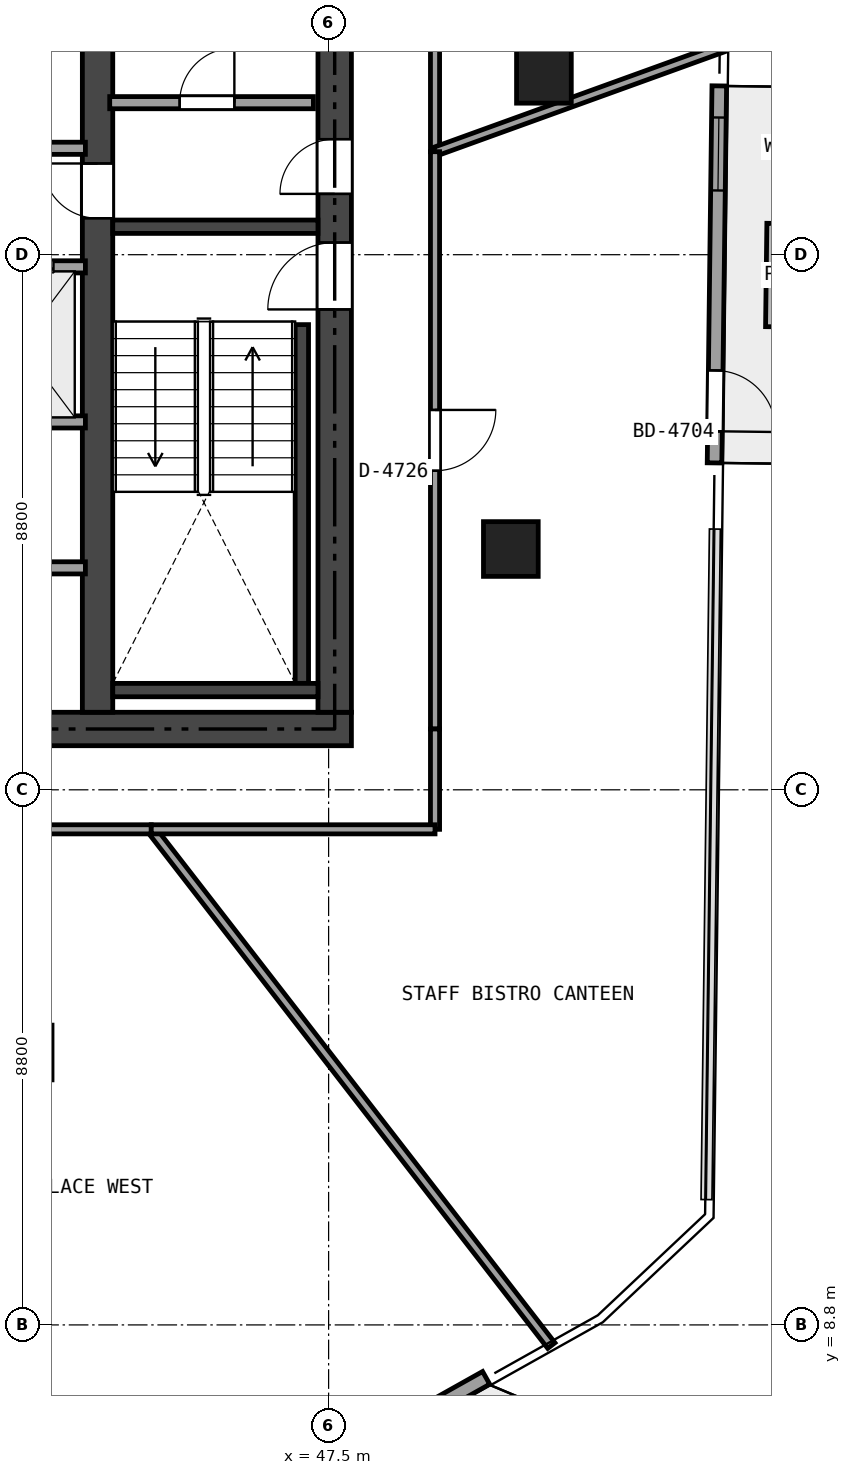
"""IFC4 building model, lengths in metres.
Left out: names, types, materials, properties, quantities, classifications, styles, units other than length and angle.
Written with IfcOpenShell. Run it as: python <this file> out.ifc"""

import sys

from ifc_helpers import new_model, si_unit, direction, frame, frame_2d, origin, origin_2d, place, context, subcontext, project, spatial, rectangle, extrude, element, fill, save


model = new_model("IFC4")
c1 = context("Model", 3, precision=1e-05, world=origin(), true_north=direction((0.0, 1.0)))
c2 = subcontext(c1, "Body", "Model", "MODEL_VIEW")
j1 = project(units=[si_unit("LENGTHUNIT", "METRE"), si_unit("PLANEANGLEUNIT", "RADIAN")], contexts=[c1])
p1 = place(None, origin())
s1 = spatial("IfcSite", under=j1, at=p1, CompositionType="ELEMENT")
p2 = place(p1, origin())
s2 = spatial("IfcBuilding", under=s1, at=p2, CompositionType="ELEMENT")
p3 = place(p2, frame((0.0, 0.0, 177.0)))
s3 = spatial("IfcBuildingStorey", under=s2, at=p3, CompositionType="ELEMENT", Elevation=177.0)
p4 = place(p3, frame((26.525, 18.6, 0.0), z_axis=(0.0, 0.0, 1.0), x_axis=(1.0, 0.0, 0.0)))
e1 = element("IfcWall", 1, at=p4, inside=s3, PredefinedType="SHEAR", context=c2, shape_type="SweptSolid", body=[
    extrude(rectangle(XDim=21.35, YDim=0.55, at=frame_2d((10.675, 0.0))), origin(), (0.0, 0.0, 1.0), 3.32),
])
p5 = place(p4, frame((12.4, 0.0, 0.0)))
e2 = element("IfcOpeningElement", 2, at=p5, cuts=e1, PredefinedType="OPENING", context=c2, shape_type="SweptSolid", body=[
    extrude(rectangle(XDim=1.15, YDim=2.15, at=frame_2d((0.575, 1.075))), frame((0.0, 0.285, 0.0), z_axis=(0.0, -1.0, 0.0), x_axis=(1.0, 0.0, 0.0)), (0.0, 0.0, 1.0), 0.57),
])
p6 = place(p4, frame((5.225, 0.0, 0.0)))
e3 = element("IfcOpeningElement", 3, at=p6, cuts=e1, PredefinedType="OPENING", context=c2, shape_type="SweptSolid", body=[
    extrude(rectangle(XDim=0.9, YDim=2.1, at=frame_2d((0.45, 1.05))), frame((0.0, 0.285, 0.0), z_axis=(0.0, -1.0, 0.0), x_axis=(1.0, 0.0, 0.0)), (0.0, 0.0, 1.0), 0.57),
])
p7 = place(p3, frame((47.6, 18.875, 0.0), z_axis=(0.0, 0.0, 1.0), x_axis=(0.0, 1.0, 0.0)))
e4 = element("IfcWall", 4, at=p7, inside=s3, PredefinedType="SHEAR", context=c2, shape_type="SweptSolid", body=[
    extrude(rectangle(XDim=15.05, YDim=0.55, at=frame_2d((7.525, 0.0))), origin(), (0.0, 0.0, 1.0), 3.32),
])
p8 = place(p7, frame((6.625, 0.0, 0.0)))
e5 = element("IfcOpeningElement", 5, at=p8, cuts=e4, PredefinedType="OPENING", context=c2, shape_type="SweptSolid", body=[
    extrude(rectangle(XDim=1.1, YDim=2.15, at=frame_2d((0.55, 1.075))), frame((0.0, 0.285, 0.0), z_axis=(0.0, -1.0, 0.0), x_axis=(1.0, 0.0, 0.0)), (0.0, 0.0, 1.0), 0.57),
])
p9 = place(p7, frame((8.525, 0.0, 0.0)))
e6 = element("IfcOpeningElement", 6, at=p9, cuts=e4, PredefinedType="OPENING", context=c2, shape_type="SweptSolid", body=[
    extrude(rectangle(XDim=0.9, YDim=2.1, at=frame_2d((0.45, 1.05))), frame((0.0, 0.285, 0.0), z_axis=(0.0, -1.0, 0.0), x_axis=(1.0, 0.0, 0.0)), (0.0, 0.0, 1.0), 0.57),
])
p10 = place(p7, frame((13.175, 0.0, 0.0)))
e7 = element("IfcOpeningElement", 7, at=p10, cuts=e4, PredefinedType="OPENING", context=c2, shape_type="SweptSolid", body=[
    extrude(rectangle(XDim=0.9, YDim=2.1, at=frame_2d((0.45, 1.05))), frame((0.0, 0.285, 0.0), z_axis=(0.0, -1.0, 0.0), x_axis=(1.0, 0.0, 0.0)), (0.0, 0.0, 1.0), 0.57),
])
p11 = place(p3, frame((43.7, 18.875, 0.0), z_axis=(0.0, 0.0, 1.0), x_axis=(0.0, 1.0, 0.0)))
e8 = element("IfcWall", 8, at=p11, inside=s3, PredefinedType="SHEAR", context=c2, shape_type="SweptSolid", body=[
    extrude(rectangle(XDim=15.05, YDim=0.5, at=frame_2d((7.525, 0.0))), origin(), (0.0, 0.0, 1.0), 3.32),
])
p12 = place(p11, frame((8.125, 0.0, 0.0)))
e9 = element("IfcOpeningElement", 9, at=p12, cuts=e8, PredefinedType="OPENING", context=c2, shape_type="SweptSolid", body=[
    extrude(rectangle(XDim=0.9, YDim=2.1, at=frame_2d((0.45, 1.05))), frame((0.0, 0.26, 0.0), z_axis=(0.0, -1.0, 0.0), x_axis=(1.0, 0.0, 0.0)), (0.0, 0.0, 1.0), 0.52),
])
p13 = place(p3, frame((43.95, 26.86, 0.0), z_axis=(0.0, 0.0, 1.0), x_axis=(1.0, 0.0, 0.0)))
e10 = element("IfcWall", 10, at=p13, inside=s3, PredefinedType="SHEAR", context=c2, shape_type="SweptSolid", body=[
    extrude(rectangle(XDim=3.375, YDim=0.22, at=frame_2d((1.688, 0.0))), origin(), (0.0, 0.0, 1.0), 3.32),
])
p14 = place(p3, frame((47.06, 19.35, 0.0), z_axis=(0.0, 0.0, 1.0), x_axis=(0.0, 1.0, 0.0)))
e11 = element("IfcWall", 11, at=p14, inside=s3, PredefinedType="SHEAR", context=c2, shape_type="SweptSolid", body=[
    extrude(rectangle(XDim=5.9, YDim=0.22, at=frame_2d((2.95, 0.0))), origin(), (0.0, 0.0, 1.0), 3.32),
])
p15 = place(p3, frame((43.95, 19.24, 0.0), z_axis=(0.0, 0.0, 1.0), x_axis=(1.0, 0.0, 0.0)))
e12 = element("IfcWall", 12, at=p15, inside=s3, PredefinedType="SHEAR", context=c2, shape_type="SweptSolid", body=[
    extrude(rectangle(XDim=3.375, YDim=0.22, at=frame_2d((1.688, 0.0))), origin(), (0.0, 0.0, 1.0), 3.32),
])
for number, where, z_axis, x_axis in (
    (13, (51.041, 29.342, -0.405), (0.0, 0.0, 1.0), (1.0, 0.0, 0.0)),
    (14, (42.501, 13.28, -0.405), (0.0, 0.0, 1.0), (1.0, 0.0, 0.0)),
    (15, (50.497, 21.56, -0.405), (0.0, 0.0, 1.0), (1.0, 0.0, 0.0)),
):
    element("IfcColumn", number, at=place(p3, frame(where, z_axis=z_axis, x_axis=x_axis)), inside=s3, PredefinedType="COLUMN", context=c2, shape_type="SweptSolid", body=[
        extrude(rectangle(XDim=0.9, YDim=0.9, at=origin_2d()), origin(), (0.0, 0.0, 1.0), 3.725),
    ])
p16 = place(p3, frame((50.091, 7.929, 0.0), z_axis=(0.0, 0.0, 1.0), x_axis=(-0.872270690653, -0.489023355504, 0.0)))
e16 = element("IfcWall", 16, at=p16, inside=s3, PredefinedType="SOLIDWALL", context=c2, shape_type="SweptSolid", body=[
    extrude(rectangle(XDim=4.0, YDim=0.24, at=frame_2d((2.0, 0.0))), origin(), (0.0, 0.0, 1.0), 3.32),
])
p17 = place(p16, frame((1.5, 0.0, 0.0)))
e17 = element("IfcOpeningElement", 17, at=p17, cuts=e16, PredefinedType="OPENING", context=c2, shape_type="SweptSolid", body=[
    extrude(rectangle(XDim=1.0, YDim=2.15, at=frame_2d((0.5, 1.075))), frame((0.0, 0.13, 0.0), z_axis=(0.0, -1.0, 0.0), x_axis=(1.0, 0.0, 0.0)), (0.0, 0.0, 1.0), 0.26),
])
p18 = place(p3, frame((53.925, 29.176, 0.0), z_axis=(0.0, 0.0, 1.0), x_axis=(-0.012599905406, -0.999920618041, 0.0)))
e18 = element("IfcWall", 18, at=p18, inside=s3, PredefinedType="SOLIDWALL", context=c2, shape_type="SweptSolid", body=[
    extrude(rectangle(XDim=6.2, YDim=0.24, at=frame_2d((3.1, 0.0))), origin(), (0.0, 0.0, 1.0), 3.32),
])
p19 = place(p18, frame((4.68, 0.0, 0.0)))
e19 = element("IfcOpeningElement", 19, at=p19, cuts=e18, PredefinedType="OPENING", context=c2, shape_type="SweptSolid", body=[
    extrude(rectangle(XDim=1.0, YDim=2.15, at=frame_2d((0.5, 1.075))), frame((0.0, 0.13, 0.0), z_axis=(0.0, -1.0, 0.0), x_axis=(1.0, 0.0, 0.0)), (0.0, 0.0, 1.0), 0.26),
])
p20 = place(p18, frame((0.52, 0.0, 0.2)))
e20 = element("IfcOpeningElement", 20, at=p20, cuts=e18, PredefinedType="OPENING", context=c2, shape_type="SweptSolid", body=[
    extrude(rectangle(XDim=1.2, YDim=1.8, at=frame_2d((0.6, 0.9))), frame((0.0, 0.13, 0.0), z_axis=(0.0, -1.0, 0.0), x_axis=(1.0, 0.0, 0.0)), (0.0, 0.0, 1.0), 0.26),
])
p21 = place(p3, frame((43.9, 28.9, 0.0), z_axis=(0.0, 0.0, 1.0), x_axis=(1.0, 0.0, 0.0)))
e21 = element("IfcWall", 21, at=p21, inside=s3, PredefinedType="SOLIDWALL", context=c2, shape_type="SweptSolid", body=[
    extrude(rectangle(XDim=3.35, YDim=0.2, at=frame_2d((1.675, 0.0))), origin(), (0.0, 0.0, 1.0), 3.32),
])
p22 = place(p21, frame((1.15, 0.0, 0.0)))
e22 = element("IfcOpeningElement", 22, at=p22, cuts=e21, PredefinedType="OPENING", context=c2, shape_type="SweptSolid", body=[
    extrude(rectangle(XDim=0.9, YDim=2.1, at=frame_2d((0.45, 1.05))), frame((0.0, 0.11, 0.0), z_axis=(0.0, -1.0, 0.0), x_axis=(1.0, 0.0, 0.0)), (0.0, 0.0, 1.0), 0.22),
])
p23 = place(p3, frame((35.62, 28.15, 0.0), z_axis=(0.0, 0.0, 1.0), x_axis=(1.0, 0.0, 0.0)))
e23 = element("IfcWall", 23, at=p23, inside=s3, PredefinedType="SOLIDWALL", context=c2, shape_type="SweptSolid", body=[
    extrude(rectangle(XDim=7.88, YDim=0.2, at=frame_2d((3.94, 0.0))), origin(), (0.0, 0.0, 1.0), 3.32),
])
p24 = place(p3, frame((35.62, 26.2, 0.0), z_axis=(0.0, 0.0, 1.0), x_axis=(1.0, 0.0, 0.0)))
e24 = element("IfcWall", 24, at=p24, inside=s3, PredefinedType="SOLIDWALL", context=c2, shape_type="SweptSolid", body=[
    extrude(rectangle(XDim=7.88, YDim=0.2, at=frame_2d((3.94, 0.0))), origin(), (0.0, 0.0, 1.0), 3.32),
])
p25 = place(p24, frame((0.405, 0.0, 0.0)))
e25 = element("IfcOpeningElement", 25, at=p25, cuts=e24, PredefinedType="OPENING", context=c2, shape_type="SweptSolid", body=[
    extrude(rectangle(XDim=1.1, YDim=2.15, at=frame_2d((0.55, 1.075))), frame((0.0, 0.11, 0.0), z_axis=(0.0, -1.0, 0.0), x_axis=(1.0, 0.0, 0.0)), (0.0, 0.0, 1.0), 0.22),
])
p26 = place(p24, frame((2.355, 0.0, 0.0)))
e26 = element("IfcOpeningElement", 26, at=p26, cuts=e24, PredefinedType="OPENING", context=c2, shape_type="SweptSolid", body=[
    extrude(rectangle(XDim=1.1, YDim=2.15, at=frame_2d((0.55, 1.075))), frame((0.0, 0.11, 0.0), z_axis=(0.0, -1.0, 0.0), x_axis=(1.0, 0.0, 0.0)), (0.0, 0.0, 1.0), 0.22),
])
p27 = place(p24, frame((4.305, 0.0, 0.0)))
e27 = element("IfcOpeningElement", 27, at=p27, cuts=e24, PredefinedType="OPENING", context=c2, shape_type="SweptSolid", body=[
    extrude(rectangle(XDim=1.1, YDim=2.15, at=frame_2d((0.55, 1.075))), frame((0.0, 0.11, 0.0), z_axis=(0.0, -1.0, 0.0), x_axis=(1.0, 0.0, 0.0)), (0.0, 0.0, 1.0), 0.22),
])
p28 = place(p24, frame((6.255, 0.0, 0.0)))
e28 = element("IfcOpeningElement", 28, at=p28, cuts=e24, PredefinedType="OPENING", context=c2, shape_type="SweptSolid", body=[
    extrude(rectangle(XDim=1.1, YDim=2.15, at=frame_2d((0.55, 1.075))), frame((0.0, 0.11, 0.0), z_axis=(0.0, -1.0, 0.0), x_axis=(1.0, 0.0, 0.0)), (0.0, 0.0, 1.0), 0.22),
])
p29 = place(p3, frame((35.62, 23.65, 0.0), z_axis=(0.0, 0.0, 1.0), x_axis=(1.0, 0.0, 0.0)))
e29 = element("IfcWall", 29, at=p29, inside=s3, PredefinedType="SOLIDWALL", context=c2, shape_type="SweptSolid", body=[
    extrude(rectangle(XDim=7.88, YDim=0.2, at=frame_2d((3.94, 0.0))), origin(), (0.0, 0.0, 1.0), 2.841),
])
p30 = place(p3, frame((35.62, 21.25, 0.0), z_axis=(0.0, 0.0, 1.0), x_axis=(1.0, 0.0, 0.0)))
e30 = element("IfcWall", 30, at=p30, inside=s3, PredefinedType="SOLIDWALL", context=c2, shape_type="SweptSolid", body=[
    extrude(rectangle(XDim=7.88, YDim=0.2, at=frame_2d((3.94, 0.0))), origin(), (0.0, 0.0, 1.0), 3.32),
])
p31 = place(p30, frame((1.13, 0.0, 0.0)))
e31 = element("IfcOpeningElement", 31, at=p31, cuts=e30, PredefinedType="OPENING", context=c2, shape_type="SweptSolid", body=[
    extrude(rectangle(XDim=0.9, YDim=2.1, at=frame_2d((0.45, 1.05))), frame((0.0, 0.11, 0.0), z_axis=(0.0, -1.0, 0.0), x_axis=(1.0, 0.0, 0.0)), (0.0, 0.0, 1.0), 0.22),
])
p32 = place(p30, frame((5.73, 0.0, 0.0)))
e32 = element("IfcOpeningElement", 32, at=p32, cuts=e30, PredefinedType="OPENING", context=c2, shape_type="SweptSolid", body=[
    extrude(rectangle(XDim=0.9, YDim=2.1, at=frame_2d((0.45, 1.05))), frame((0.0, 0.11, 0.0), z_axis=(0.0, -1.0, 0.0), x_axis=(1.0, 0.0, 0.0)), (0.0, 0.0, 1.0), 0.22),
])
p33 = place(p3, frame((49.25, 34.2, 0.0), z_axis=(0.0, 0.0, 1.0), x_axis=(0.0, -1.0, 0.0)))
e33 = element("IfcWall", 33, at=p33, inside=s3, PredefinedType="PARTITIONING", context=c2, shape_type="SweptSolid", body=[
    extrude(rectangle(XDim=6.106, YDim=0.15, at=frame_2d((3.053, 0.0))), origin(), (0.0, 0.0, 1.0), 2.697),
])
p34 = place(p33, frame((2.553, 0.0, 0.0)))
e34 = element("IfcOpeningElement", 34, at=p34, cuts=e33, PredefinedType="OPENING", context=c2, shape_type="SweptSolid", body=[
    extrude(rectangle(XDim=1.0, YDim=2.15, at=frame_2d((0.5, 1.075))), frame((0.0, 0.085, 0.0), z_axis=(0.0, -1.0, 0.0), x_axis=(1.0, 0.0, 0.0)), (0.0, 0.0, 1.0), 0.17),
])
p35 = place(p3, frame((49.25, 28.094, 0.0), z_axis=(0.0, 0.0, 1.0), x_axis=(0.940392359165, 0.340091474201, 0.0)))
e35 = element("IfcWall", 35, at=p35, inside=s3, PredefinedType="PARTITIONING", context=c2, shape_type="SweptSolid", body=[
    extrude(rectangle(XDim=5.046, YDim=0.15, at=frame_2d((2.523, 0.0))), origin(), (0.0, 0.0, 1.0), 2.905),
])
p36 = place(p3, frame((51.163, 8.46, 0.0), z_axis=(0.0, 0.0, 1.0), x_axis=(-0.61259119033, 0.790399919996, 0.0)))
e36 = element("IfcWall", 36, at=p36, inside=s3, PredefinedType="PARTITIONING", context=c2, shape_type="SweptSolid", body=[
    extrude(rectangle(XDim=10.741, YDim=0.15, at=frame_2d((5.371, 0.0))), origin(), (0.0, 0.0, 1.0), 2.841),
])
p37 = place(p3, frame((44.583, 16.95, 0.0), z_axis=(0.0, 0.0, 1.0), x_axis=(-1.0, 0.0, 0.0)))
e37 = element("IfcWall", 37, at=p37, inside=s3, PredefinedType="PARTITIONING", context=c2, shape_type="SweptSolid", body=[
    extrude(rectangle(XDim=10.093, YDim=0.15, at=frame_2d((5.046, 0.0))), origin(), (0.0, 0.0, 1.0), 2.697),
])
p38 = place(p37, frame((4.546, 0.0, 0.0)))
e38 = element("IfcOpeningElement", 38, at=p38, cuts=e37, PredefinedType="OPENING", context=c2, shape_type="SweptSolid", body=[
    extrude(rectangle(XDim=1.0, YDim=2.15, at=frame_2d((0.5, 1.075))), frame((0.0, 0.085, 0.0), z_axis=(0.0, -1.0, 0.0), x_axis=(1.0, 0.0, 0.0)), (0.0, 0.0, 1.0), 0.17),
])
p39 = place(p3, frame((49.25, 28.094, 0.0), z_axis=(0.0, 0.0, 1.0), x_axis=(0.0, -1.0, 0.0)))
e39 = element("IfcWall", 39, at=p39, inside=s3, PredefinedType="PARTITIONING", context=c2, shape_type="SweptSolid", body=[
    extrude(rectangle(XDim=9.494, YDim=0.15, at=frame_2d((4.747, 0.0))), origin(), (0.0, 0.0, 1.0), 2.697),
])
p40 = place(p39, frame((4.247, 0.0, 0.0)))
e40 = element("IfcOpeningElement", 40, at=p40, cuts=e39, PredefinedType="OPENING", context=c2, shape_type="SweptSolid", body=[
    extrude(rectangle(XDim=1.0, YDim=2.15, at=frame_2d((0.5, 1.075))), frame((0.0, 0.085, 0.0), z_axis=(0.0, -1.0, 0.0), x_axis=(1.0, 0.0, 0.0)), (0.0, 0.0, 1.0), 0.17),
])
p41 = place(p3, frame((49.25, 18.6, 0.0), z_axis=(0.0, 0.0, 1.0), x_axis=(0.0, -1.0, 0.0)))
e41 = element("IfcWall", 41, at=p41, inside=s3, PredefinedType="PARTITIONING", context=c2, shape_type="SweptSolid", body=[
    extrude(rectangle(XDim=1.65, YDim=0.15, at=frame_2d((0.825, 0.0))), origin(), (0.0, 0.0, 1.0), 3.32),
])
p42 = place(p3, frame((49.25, 16.95, 0.0), z_axis=(0.0, 0.0, 1.0), x_axis=(-1.0, 0.0, 0.0)))
e42 = element("IfcWall", 42, at=p42, inside=s3, PredefinedType="PARTITIONING", context=c2, shape_type="SweptSolid", body=[
    extrude(rectangle(XDim=4.667, YDim=0.15, at=frame_2d((2.333, 0.0))), origin(), (0.0, 0.0, 1.0), 2.841),
])
p43 = place(p19, origin())
e43 = element("IfcDoor", 43, at=p43, inside=s3, OperationType="SINGLE_SWING_RIGHT", PredefinedType="DOOR", context=c2, shape_type="SweptSolid", body=[
    extrude(rectangle(XDim=1.0, YDim=2.15, at=frame_2d((0.5, 1.075))), frame((0.0, 0.025, 0.0), z_axis=(0.0, -1.0, 0.0), x_axis=(1.0, 0.0, 0.0)), (0.0, 0.0, 1.0), 0.05),
])
fill(e19, e43)
p44 = place(p20, origin())
e44 = element("IfcWindow", 44, at=p44, inside=s3, PartitioningType="SINGLE_PANEL", PredefinedType="WINDOW", context=c2, shape_type="SweptSolid", body=[
    extrude(rectangle(XDim=1.2, YDim=1.8, at=frame_2d((0.6, 0.9))), frame((0.0, 0.03, 0.0), z_axis=(0.0, -1.0, 0.0), x_axis=(1.0, 0.0, 0.0)), (0.0, 0.0, 1.0), 0.06),
])
fill(e20, e44)
p45 = place(p8, origin())
e45 = element("IfcDoor", 45, at=p45, inside=s3, OperationType="SINGLE_SWING_LEFT", PredefinedType="DOOR", context=c2, shape_type="SweptSolid", body=[
    extrude(rectangle(XDim=1.1, YDim=2.15, at=frame_2d((0.55, 1.075))), frame((0.0, 0.025, 0.0), z_axis=(0.0, -1.0, 0.0), x_axis=(1.0, 0.0, 0.0)), (0.0, 0.0, 1.0), 0.05),
])
fill(e5, e45)
p46 = place(p12, origin())
e46 = element("IfcDoor", 46, at=p46, inside=s3, OperationType="SINGLE_SWING_RIGHT", PredefinedType="DOOR", context=c2, shape_type="SweptSolid", body=[
    extrude(rectangle(XDim=0.9, YDim=2.1, at=frame_2d((0.45, 1.05))), frame((0.0, 0.025, 0.0), z_axis=(0.0, -1.0, 0.0), x_axis=(1.0, 0.0, 0.0)), (0.0, 0.0, 1.0), 0.05),
])
fill(e9, e46)
p47 = place(p9, origin())
e47 = element("IfcDoor", 47, at=p47, inside=s3, OperationType="SINGLE_SWING_LEFT", PredefinedType="DOOR", context=c2, shape_type="SweptSolid", body=[
    extrude(rectangle(XDim=0.9, YDim=2.1, at=frame_2d((0.45, 1.05))), frame((0.0, 0.025, 0.0), z_axis=(0.0, -1.0, 0.0), x_axis=(1.0, 0.0, 0.0)), (0.0, 0.0, 1.0), 0.05),
])
fill(e6, e47)
p48 = place(p22, origin())
e48 = element("IfcDoor", 48, at=p48, inside=s3, OperationType="SINGLE_SWING_RIGHT", PredefinedType="DOOR", context=c2, shape_type="SweptSolid", body=[
    extrude(rectangle(XDim=0.9, YDim=2.1, at=frame_2d((0.45, 1.05))), frame((0.0, 0.025, 0.0), z_axis=(0.0, -1.0, 0.0), x_axis=(1.0, 0.0, 0.0)), (0.0, 0.0, 1.0), 0.05),
])
fill(e22, e48)
p49 = place(p28, origin())
e49 = element("IfcDoor", 49, at=p49, inside=s3, OperationType="SLIDING_TO_LEFT", PredefinedType="DOOR", context=c2, shape_type="SweptSolid", body=[
    extrude(rectangle(XDim=1.1, YDim=2.15, at=frame_2d((0.55, 1.075))), frame((0.0, 0.025, 0.0), z_axis=(0.0, -1.0, 0.0), x_axis=(1.0, 0.0, 0.0)), (0.0, 0.0, 1.0), 0.05),
])
fill(e28, e49)
p50 = place(p40, origin())
e50 = element("IfcDoor", 50, at=p50, inside=s3, OperationType="SINGLE_SWING_LEFT", PredefinedType="DOOR", context=c2, shape_type="SweptSolid", body=[
    extrude(rectangle(XDim=1.0, YDim=2.15, at=frame_2d((0.5, 1.075))), frame((0.0, 0.025, 0.0), z_axis=(0.0, -1.0, 0.0), x_axis=(1.0, 0.0, 0.0)), (0.0, 0.0, 1.0), 0.05),
])
fill(e40, e50)
save(model, sys.argv[1])
